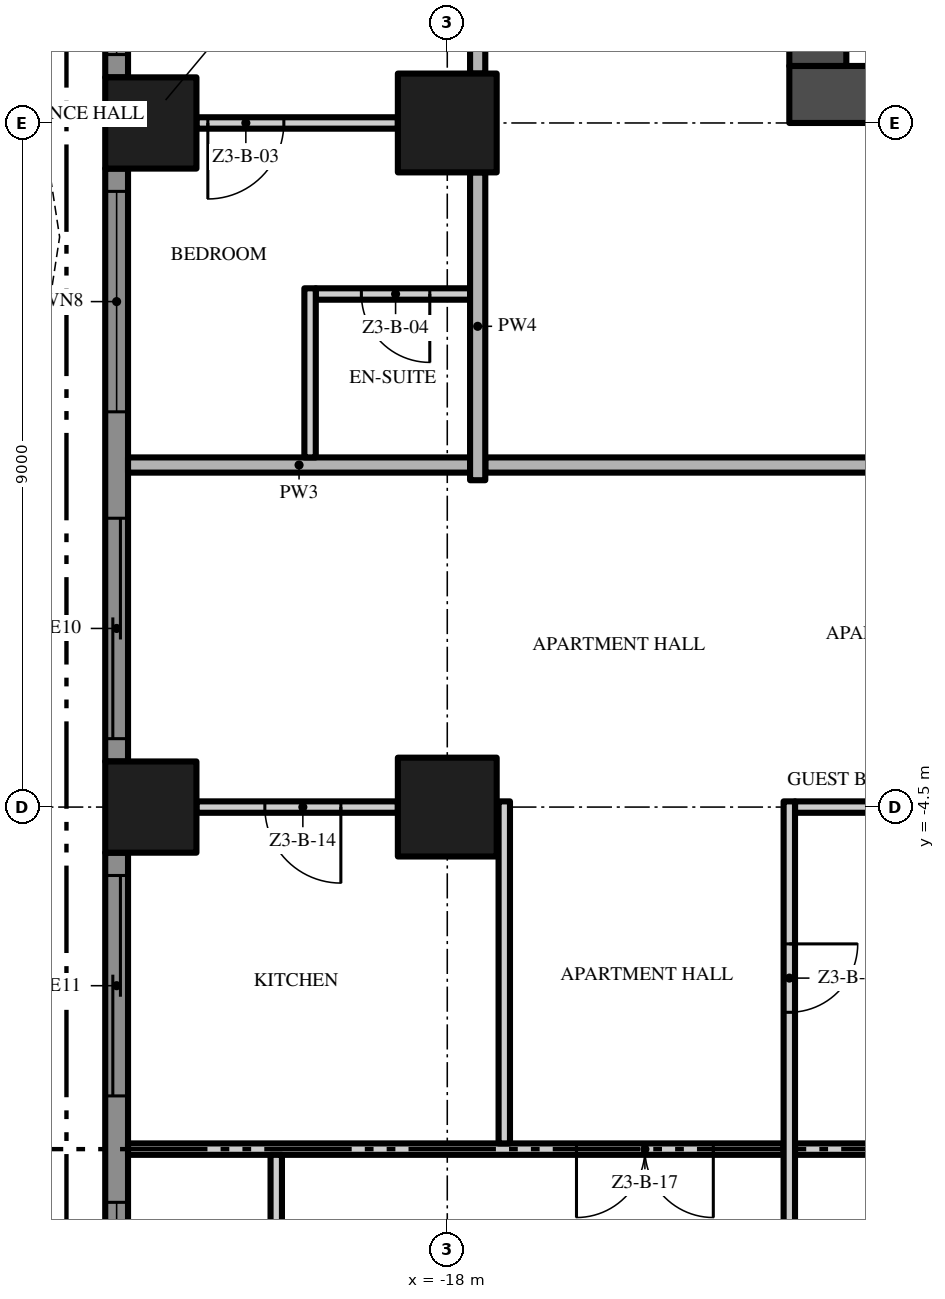
"""IFC4 building model, lengths in metres.
Left out: names, types, materials, properties, quantities, classifications, styles, units other than length and angle.
Written with IfcOpenShell. Run it as: python <this file> out.ifc"""

import sys

from ifc_helpers import new_model, si_unit, direction, frame, frame_2d, origin, origin_2d, place, context, subcontext, project, spatial, polyline, rectangle, outline, extrude, element, fill, save


model = new_model("IFC4")
c1 = context("Model", 3, precision=1e-05, world=origin(), true_north=direction((0.0, 1.0)))
c2 = subcontext(c1, "Body", "Model", "MODEL_VIEW")
j1 = project(units=[si_unit("LENGTHUNIT", "METRE"), si_unit("PLANEANGLEUNIT", "RADIAN")], contexts=[c1])
p1 = place(None, origin())
s1 = spatial("IfcSite", under=j1, at=p1, CompositionType="ELEMENT")
p2 = place(p1, origin())
s2 = spatial("IfcBuilding", under=s1, at=p2, CompositionType="ELEMENT")
p3 = place(p2, frame((0.0, 0.0, 136.4)))
s3 = spatial("IfcBuildingStorey", under=s2, at=p3, CompositionType="ELEMENT", Elevation=136.4)
p4 = place(p3, frame((-13.5, 4.875, -0.3), z_axis=(0.0, 0.0, 1.0), x_axis=(1.0, 0.0, 0.0)))
e1 = element("IfcWall", 1, at=p4, inside=s3, PredefinedType="SHEAR", context=c2, shape_type="SweptSolid", body=[
    extrude(rectangle(XDim=27.0, YDim=0.75, at=frame_2d((13.5, 0.0))), origin(), (0.0, 0.0, 1.0), 3.8),
])
p5 = place(p4, frame((12.0, 0.0, 0.3)))
e2 = element("IfcOpeningElement", 2, at=p5, cuts=e1, PredefinedType="OPENING", context=c2, shape_type="SweptSolid", body=[
    extrude(rectangle(XDim=3.0, YDim=2.4, at=frame_2d((1.5, 1.2))), frame((0.0, 0.385, 0.0), z_axis=(0.0, -1.0, 0.0), x_axis=(1.0, 0.0, 0.0)), (0.0, 0.0, 1.0), 0.77),
])
p6 = place(p4, frame((4.9, 0.0, 0.3)))
e3 = element("IfcOpeningElement", 3, at=p6, cuts=e1, PredefinedType="OPENING", context=c2, shape_type="SweptSolid", body=[
    extrude(rectangle(XDim=1.2, YDim=2.2, at=frame_2d((0.6, 1.1))), frame((0.0, 0.385, 0.0), z_axis=(0.0, -1.0, 0.0), x_axis=(1.0, 0.0, 0.0)), (0.0, 0.0, 1.0), 0.77),
])
p7 = place(p4, frame((20.75, 0.0, 0.3)))
e4 = element("IfcOpeningElement", 4, at=p7, cuts=e1, PredefinedType="OPENING", context=c2, shape_type="SweptSolid", body=[
    extrude(rectangle(XDim=1.5, YDim=2.2, at=frame_2d((0.75, 1.1))), frame((0.0, 0.385, 0.0), z_axis=(0.0, -1.0, 0.0), x_axis=(1.0, 0.0, 0.0)), (0.0, 0.0, 1.0), 0.77),
])
p8 = place(p4, frame((17.4, 0.0, 0.3)))
e5 = element("IfcOpeningElement", 5, at=p8, cuts=e1, PredefinedType="OPENING", context=c2, shape_type="SweptSolid", body=[
    extrude(rectangle(XDim=1.2, YDim=2.2, at=frame_2d((0.6, 1.1))), frame((0.0, 0.385, 0.0), z_axis=(0.0, -1.0, 0.0), x_axis=(1.0, 0.0, 0.0)), (0.0, 0.0, 1.0), 0.77),
])
p9 = place(p3, frame((-13.125, 21.75, -0.3), z_axis=(0.0, 0.0, 1.0), x_axis=(0.0, -1.0, 0.0)))
e6 = element("IfcWall", 6, at=p9, inside=s3, PredefinedType="SHEAR", context=c2, shape_type="SweptSolid", body=[
    extrude(rectangle(XDim=16.5, YDim=0.75, at=frame_2d((8.25, 0.0))), origin(), (0.0, 0.0, 1.0), 3.8),
])
p10 = place(p9, frame((9.15, 0.0, 0.3)))
e7 = element("IfcOpeningElement", 7, at=p10, cuts=e6, PredefinedType="OPENING", context=c2, shape_type="SweptSolid", body=[
    extrude(rectangle(XDim=1.2, YDim=2.2, at=frame_2d((0.6, 1.1))), frame((0.0, 0.385, 0.0), z_axis=(0.0, -1.0, 0.0), x_axis=(1.0, 0.0, 0.0)), (0.0, 0.0, 1.0), 0.77),
])
for number, where, z_axis, x_axis in (
    (8, (-18.0, -4.5, 0.0), (0.0, 0.0, 1.0), (1.0, 0.0, 0.0)),
    (9, (-18.0, 4.5, 0.0), (0.0, 0.0, 1.0), (1.0, 0.0, 0.0)),
):
    element("IfcColumn", number, at=place(p3, frame(where, z_axis=z_axis, x_axis=x_axis)), inside=s3, PredefinedType="COLUMN", context=c2, shape_type="SweptSolid", body=[
        extrude(rectangle(XDim=1.3, YDim=1.3, at=origin_2d()), origin(), (0.0, 0.0, 1.0), 3.5),
    ])
for number, where, z_axis, x_axis in (
    (10, (-21.9, -4.5, 0.0), (0.0, 0.0, 1.0), (1.0, 0.0, 0.0)),
    (11, (-21.9, 4.5, 0.0), (0.0, 0.0, 1.0), (1.0, 0.0, 0.0)),
):
    element("IfcColumn", number, at=place(p3, frame(where, z_axis=z_axis, x_axis=x_axis)), inside=s3, PredefinedType="COLUMN", context=c2, shape_type="SweptSolid", body=[
        extrude(rectangle(XDim=1.2, YDim=1.2, at=origin_2d()), origin(), (0.0, 0.0, 1.0), 3.5),
    ])
p11 = place(p3, frame((-22.35, 5.1, 0.0), z_axis=(0.0, 0.0, 1.0), x_axis=(0.0, 1.0, 0.0)))
e12 = element("IfcWall", 12, at=p11, inside=s3, PredefinedType="SOLIDWALL", context=c2, shape_type="SweptSolid", body=[
    extrude(rectangle(XDim=7.8, YDim=0.3, at=frame_2d((3.9, 0.0))), origin(), (0.0, 0.0, 1.0), 3.5),
])
p12 = place(p11, frame((4.6, 0.0, 0.0)))
e13 = element("IfcOpeningElement", 13, at=p12, cuts=e12, PredefinedType="OPENING", context=c2, shape_type="SweptSolid", body=[
    extrude(rectangle(XDim=2.9, YDim=2.4, at=frame_2d((1.45, 1.2))), frame((0.0, 0.16, 0.0), z_axis=(0.0, -1.0, 0.0), x_axis=(1.0, 0.0, 0.0)), (0.0, 0.0, 1.0), 0.32),
])
p13 = place(p11, frame((0.3, 0.0, 0.45)))
e14 = element("IfcOpeningElement", 14, at=p13, cuts=e12, PredefinedType="OPENING", context=c2, shape_type="SweptSolid", body=[
    extrude(rectangle(XDim=2.9, YDim=2.65, at=frame_2d((1.45, 1.325))), frame((0.0, 0.16, 0.0), z_axis=(0.0, -1.0, 0.0), x_axis=(1.0, 0.0, 0.0)), (0.0, 0.0, 1.0), 0.32),
])
p14 = place(p3, frame((-22.35, -3.9, 0.0), z_axis=(0.0, 0.0, 1.0), x_axis=(0.0, 1.0, 0.0)))
e15 = element("IfcWall", 15, at=p14, inside=s3, PredefinedType="SOLIDWALL", context=c2, shape_type="SweptSolid", body=[
    extrude(rectangle(XDim=7.8, YDim=0.3, at=frame_2d((3.9, 0.0))), origin(), (0.0, 0.0, 1.0), 3.5),
])
p15 = place(p14, frame((4.6, 0.0, 0.45)))
e16 = element("IfcOpeningElement", 16, at=p15, cuts=e15, PredefinedType="OPENING", context=c2, shape_type="SweptSolid", body=[
    extrude(rectangle(XDim=2.9, YDim=2.65, at=frame_2d((1.45, 1.325))), frame((0.0, 0.16, 0.0), z_axis=(0.0, -1.0, 0.0), x_axis=(1.0, 0.0, 0.0)), (0.0, 0.0, 1.0), 0.32),
])
p16 = place(p14, frame((0.3, 0.0, 0.0)))
e17 = element("IfcOpeningElement", 17, at=p16, cuts=e15, PredefinedType="OPENING", context=c2, shape_type="SweptSolid", body=[
    extrude(rectangle(XDim=2.9, YDim=2.4, at=frame_2d((1.45, 1.2))), frame((0.0, 0.16, 0.0), z_axis=(0.0, -1.0, 0.0), x_axis=(1.0, 0.0, 0.0)), (0.0, 0.0, 1.0), 0.32),
])
p17 = place(p3, frame((-22.35, -12.3, 0.0), z_axis=(0.0, 0.0, 1.0), x_axis=(0.0, 1.0, 0.0)))
e18 = element("IfcWall", 18, at=p17, inside=s3, PredefinedType="SOLIDWALL", context=c2, shape_type="SweptSolid", body=[
    extrude(rectangle(XDim=7.2, YDim=0.3, at=frame_2d((3.6, 0.0))), origin(), (0.0, 0.0, 1.0), 3.5),
])
p18 = place(p17, frame((4.0, 0.0, 0.0)))
e19 = element("IfcOpeningElement", 19, at=p18, cuts=e18, PredefinedType="OPENING", context=c2, shape_type="SweptSolid", body=[
    extrude(rectangle(XDim=2.9, YDim=2.4, at=frame_2d((1.45, 1.2))), frame((0.0, 0.16, 0.0), z_axis=(0.0, -1.0, 0.0), x_axis=(1.0, 0.0, 0.0)), (0.0, 0.0, 1.0), 0.32),
])
p19 = place(p17, frame((0.3, 0.0, 0.45)))
e20 = element("IfcOpeningElement", 20, at=p19, cuts=e18, PredefinedType="OPENING", context=c2, shape_type="SweptSolid", body=[
    extrude(rectangle(XDim=2.3, YDim=2.65, at=frame_2d((1.15, 1.325))), frame((0.0, 0.16, 0.0), z_axis=(0.0, -1.0, 0.0), x_axis=(1.0, 0.0, 0.0)), (0.0, 0.0, 1.0), 0.32),
])
p20 = place(p3, origin())
e21 = element("IfcWall", 21, at=p20, inside=s3, PredefinedType="USERDEFINED", context=c2, shape_type="SweptSolid", body=[
    extrude(outline(polyline([(-23.1, 18.0), (-23.329, 16.5), (-23.929, 15.0), (-24.671, 13.5), (-25.271, 12.0), (-25.5, 10.5), (-25.271, 9.0), (-24.671, 7.5), (-23.929, 6.0), (-23.329, 4.5), (-23.1, 3.0), (-23.329, 1.5), (-23.929, 0.0), (-24.671, -1.5), (-25.271, -3.0), (-25.5, -4.5), (-25.271, -6.0), (-24.671, -7.5), (-23.929, -9.0), (-23.329, -10.5), (-23.1, -12.0), (-23.329, -13.5), (-23.082, -13.538), (-22.847, -12.0), (-23.086, -10.434), (-23.701, -8.898), (-24.442, -7.398), (-25.028, -5.934), (-25.247, -4.5), (-25.028, -3.066), (-24.442, -1.602), (-23.701, -0.102), (-23.086, 1.434), (-22.847, 3.0), (-23.086, 4.566), (-23.701, 6.102), (-24.442, 7.602), (-25.028, 9.066), (-25.247, 10.5), (-25.028, 11.934), (-24.442, 13.398), (-23.701, 14.898), (-23.086, 16.434), (-22.853, 17.962), (-23.1, 18.0)])), origin(), (0.0, 0.0, 1.0), 0.9),
])
p21 = place(p3, frame((-13.575, -9.0, 0.0), z_axis=(0.0, 0.0, 1.0), x_axis=(-1.0, 0.0, 0.0)))
e22 = element("IfcWall", 22, at=p21, inside=s3, PredefinedType="PARTITIONING", context=c2, shape_type="SweptSolid", body=[
    extrude(rectangle(XDim=8.625, YDim=0.15, at=frame_2d((4.312, 0.0))), origin(), (0.0, 0.0, 1.0), 3.5),
])
p22 = place(p21, frame((0.925, 0.0, 0.0)))
e23 = element("IfcOpeningElement", 23, at=p22, cuts=e22, PredefinedType="OPENING", context=c2, shape_type="SweptSolid", body=[
    extrude(rectangle(XDim=1.8, YDim=2.4, at=frame_2d((0.9, 1.2))), frame((0.0, 0.085, 0.0), z_axis=(0.0, -1.0, 0.0), x_axis=(1.0, 0.0, 0.0)), (0.0, 0.0, 1.0), 0.17),
])
p23 = place(p3, frame((-13.425, -9.0, 0.0), z_axis=(0.0, 0.0, 1.0), x_axis=(1.0, 0.0, 0.0)))
e24 = element("IfcWall", 24, at=p23, inside=s3, PredefinedType="PARTITIONING", context=c2, shape_type="SweptSolid", body=[
    extrude(rectangle(XDim=2.1, YDim=0.15, at=frame_2d((1.05, 0.0))), origin(), (0.0, 0.0, 1.0), 3.5),
])
p24 = place(p3, frame((-18.65, -4.5, 0.0), z_axis=(0.0, 0.0, 1.0), x_axis=(-1.0, 0.0, 0.0)))
e25 = element("IfcWall", 25, at=p24, inside=s3, PredefinedType="PARTITIONING", context=c2, shape_type="SweptSolid", body=[
    extrude(rectangle(XDim=2.65, YDim=0.15, at=frame_2d((1.325, 0.0))), origin(), (0.0, 0.0, 1.0), 3.5),
])
p25 = place(p24, frame((0.75, 0.0, 0.0)))
e26 = element("IfcOpeningElement", 26, at=p25, cuts=e25, PredefinedType="OPENING", context=c2, shape_type="SweptSolid", body=[
    extrude(rectangle(XDim=1.0, YDim=2.4, at=frame_2d((0.5, 1.2))), frame((0.0, 0.085, 0.0), z_axis=(0.0, -1.0, 0.0), x_axis=(1.0, 0.0, 0.0)), (0.0, 0.0, 1.0), 0.17),
])
p26 = place(p3, frame((-13.425, -4.5, 0.0), z_axis=(0.0, 0.0, 1.0), x_axis=(1.0, 0.0, 0.0)))
e27 = element("IfcWall", 27, at=p26, inside=s3, PredefinedType="PARTITIONING", context=c2, shape_type="SweptSolid", body=[
    extrude(rectangle(XDim=2.1, YDim=0.15, at=frame_2d((1.05, 0.0))), origin(), (0.0, 0.0, 1.0), 3.5),
])
p27 = place(p3, frame((17.5, 0.0, 0.0), z_axis=(0.0, 0.0, 1.0), x_axis=(-1.0, 0.0, 0.0)))
e28 = element("IfcWall", 28, at=p27, inside=s3, PredefinedType="PARTITIONING", context=c2, shape_type="SweptSolid", body=[
    extrude(rectangle(XDim=35.0, YDim=0.2, at=frame_2d((17.5, 0.0))), origin(), (0.0, 0.0, 1.0), 3.5),
])
p28 = place(p27, frame((28.0, 0.0, 0.0)))
e29 = element("IfcOpeningElement", 29, at=p28, cuts=e28, PredefinedType="OPENING", context=c2, shape_type="SweptSolid", body=[
    extrude(rectangle(XDim=1.5, YDim=2.4, at=frame_2d((0.75, 1.2))), frame((0.0, 0.11, 0.0), z_axis=(0.0, -1.0, 0.0), x_axis=(1.0, 0.0, 0.0)), (0.0, 0.0, 1.0), 0.22),
])
p29 = place(p27, frame((10.0, 0.0, 0.0)))
e30 = element("IfcOpeningElement", 30, at=p29, cuts=e28, PredefinedType="OPENING", context=c2, shape_type="SweptSolid", body=[
    extrude(rectangle(XDim=1.5, YDim=2.4, at=frame_2d((0.75, 1.2))), frame((0.0, 0.11, 0.0), z_axis=(0.0, -1.0, 0.0), x_axis=(1.0, 0.0, 0.0)), (0.0, 0.0, 1.0), 0.22),
])
p30 = place(p3, frame((-22.2, 0.0, 0.0), z_axis=(0.0, 0.0, 1.0), x_axis=(1.0, 0.0, 0.0)))
e31 = element("IfcWall", 31, at=p30, inside=s3, PredefinedType="PARTITIONING", context=c2, shape_type="SweptSolid", body=[
    extrude(rectangle(XDim=4.5, YDim=0.2, at=frame_2d((2.25, 0.0))), origin(), (0.0, 0.0, 1.0), 3.5),
])
p31 = place(p3, frame((-17.7, 2.25, 0.0), z_axis=(0.0, 0.0, 1.0), x_axis=(-1.0, 0.0, 0.0)))
e32 = element("IfcWall", 32, at=p31, inside=s3, PredefinedType="PARTITIONING", context=c2, shape_type="SweptSolid", body=[
    extrude(rectangle(XDim=2.03, YDim=0.15, at=frame_2d((1.015, 0.0))), origin(), (0.0, 0.0, 1.0), 3.5),
])
p32 = place(p31, frame((0.53, 0.0, 0.0)))
e33 = element("IfcOpeningElement", 33, at=p32, cuts=e32, PredefinedType="OPENING", context=c2, shape_type="SweptSolid", body=[
    extrude(rectangle(XDim=0.9, YDim=2.1, at=frame_2d((0.45, 1.05))), frame((0.0, 0.085, 0.0), z_axis=(0.0, -1.0, 0.0), x_axis=(1.0, 0.0, 0.0)), (0.0, 0.0, 1.0), 0.17),
])
p33 = place(p3, frame((-18.65, 4.5, 0.0), z_axis=(0.0, 0.0, 1.0), x_axis=(-1.0, 0.0, 0.0)))
e34 = element("IfcWall", 34, at=p33, inside=s3, PredefinedType="PARTITIONING", context=c2, shape_type="SweptSolid", body=[
    extrude(rectangle(XDim=2.65, YDim=0.15, at=frame_2d((1.325, 0.0))), origin(), (0.0, 0.0, 1.0), 3.5),
])
p34 = place(p33, frame((1.5, 0.0, 0.0)))
e35 = element("IfcOpeningElement", 35, at=p34, cuts=e34, PredefinedType="OPENING", context=c2, shape_type="SweptSolid", body=[
    extrude(rectangle(XDim=1.0, YDim=2.4, at=frame_2d((0.5, 1.2))), frame((0.0, 0.085, 0.0), z_axis=(0.0, -1.0, 0.0), x_axis=(1.0, 0.0, 0.0)), (0.0, 0.0, 1.0), 0.17),
])
p35 = place(p3, frame((-20.25, -12.075, 0.0), z_axis=(0.0, 0.0, 1.0), x_axis=(0.0, 1.0, 0.0)))
e36 = element("IfcWall", 36, at=p35, inside=s3, PredefinedType="PARTITIONING", context=c2, shape_type="SweptSolid", body=[
    extrude(rectangle(XDim=3.0, YDim=0.15, at=frame_2d((1.5, 0.0))), origin(), (0.0, 0.0, 1.0), 3.5),
])
p36 = place(p35, frame((1.125, 0.0, 0.0)))
e37 = element("IfcOpeningElement", 37, at=p36, cuts=e36, PredefinedType="OPENING", context=c2, shape_type="SweptSolid", body=[
    extrude(rectangle(XDim=0.9, YDim=2.1, at=frame_2d((0.45, 1.05))), frame((0.0, 0.085, 0.0), z_axis=(0.0, -1.0, 0.0), x_axis=(1.0, 0.0, 0.0)), (0.0, 0.0, 1.0), 0.17),
])
p37 = place(p3, frame((-19.805, 0.1, 0.0), z_axis=(0.0, 0.0, 1.0), x_axis=(0.0, 1.0, 0.0)))
e38 = element("IfcWall", 38, at=p37, inside=s3, PredefinedType="PARTITIONING", context=c2, shape_type="SweptSolid", body=[
    extrude(rectangle(XDim=2.225, YDim=0.15, at=frame_2d((1.113, 0.0))), origin(), (0.0, 0.0, 1.0), 3.5),
])
p38 = place(p3, frame((-17.6, -0.2, 0.0), z_axis=(0.0, 0.0, 1.0), x_axis=(0.0, 1.0, 0.0)))
e39 = element("IfcWall", 39, at=p38, inside=s3, PredefinedType="PARTITIONING", context=c2, shape_type="SweptSolid", body=[
    extrude(rectangle(XDim=4.05, YDim=0.2, at=frame_2d((2.025, 0.0))), origin(), (0.0, 0.0, 1.0), 3.5),
])
p39 = place(p3, frame((-17.6, 5.15, 0.0), z_axis=(0.0, 0.0, 1.0), x_axis=(0.0, 1.0, 0.0)))
e40 = element("IfcWall", 40, at=p39, inside=s3, PredefinedType="PARTITIONING", context=c2, shape_type="SweptSolid", body=[
    extrude(rectangle(XDim=7.7, YDim=0.2, at=frame_2d((3.85, 0.0))), origin(), (0.0, 0.0, 1.0), 3.5),
])
p40 = place(p39, frame((1.0, 0.0, 0.0)))
e41 = element("IfcOpeningElement", 41, at=p40, cuts=e40, PredefinedType="OPENING", context=c2, shape_type="SweptSolid", body=[
    extrude(rectangle(XDim=1.2, YDim=2.4, at=frame_2d((0.6, 1.2))), frame((0.0, 0.11, 0.0), z_axis=(0.0, -1.0, 0.0), x_axis=(1.0, 0.0, 0.0)), (0.0, 0.0, 1.0), 0.22),
])
p41 = place(p3, frame((-17.25, -8.925, 0.0), z_axis=(0.0, 0.0, 1.0), x_axis=(0.0, 1.0, 0.0)))
e42 = element("IfcWall", 42, at=p41, inside=s3, PredefinedType="PARTITIONING", context=c2, shape_type="SweptSolid", body=[
    extrude(rectangle(XDim=4.5, YDim=0.15, at=frame_2d((2.25, 0.0))), origin(), (0.0, 0.0, 1.0), 3.5),
])
p42 = place(p3, frame((-13.5, -4.425, 0.0), z_axis=(0.0, 0.0, 1.0), x_axis=(0.0, -1.0, 0.0)))
e43 = element("IfcWall", 43, at=p42, inside=s3, PredefinedType="PARTITIONING", context=c2, shape_type="SweptSolid", body=[
    extrude(rectangle(XDim=13.275, YDim=0.15, at=frame_2d((6.638, 0.0))), origin(), (0.0, 0.0, 1.0), 3.5),
])
p43 = place(p42, frame((1.875, 0.0, 0.0)))
e44 = element("IfcOpeningElement", 44, at=p43, cuts=e43, PredefinedType="OPENING", context=c2, shape_type="SweptSolid", body=[
    extrude(rectangle(XDim=0.9, YDim=2.1, at=frame_2d((0.45, 1.05))), frame((0.0, 0.085, 0.0), z_axis=(0.0, -1.0, 0.0), x_axis=(1.0, 0.0, 0.0)), (0.0, 0.0, 1.0), 0.17),
])
p44 = place(p13, origin())
e45 = element("IfcWindow", 45, at=p44, inside=s3, PartitioningType="SINGLE_PANEL", PredefinedType="WINDOW", context=c2, shape_type="SweptSolid", body=[
    extrude(rectangle(XDim=2.9, YDim=2.65, at=frame_2d((1.45, 1.325))), frame((0.0, 0.03, 0.0), z_axis=(0.0, -1.0, 0.0), x_axis=(1.0, 0.0, 0.0)), (0.0, 0.0, 1.0), 0.06),
])
fill(e14, e45)
p45 = place(p15, origin())
e46 = element("IfcWindow", 46, at=p45, inside=s3, PartitioningType="SINGLE_PANEL", PredefinedType="WINDOW", context=c2, shape_type="SweptSolid", body=[
    extrude(rectangle(XDim=2.9, YDim=2.65, at=frame_2d((1.45, 1.325))), frame((0.0, 0.03, 0.0), z_axis=(0.0, -1.0, 0.0), x_axis=(1.0, 0.0, 0.0)), (0.0, 0.0, 1.0), 0.06),
])
fill(e16, e46)
p46 = place(p16, origin())
e47 = element("IfcDoor", 47, at=p46, inside=s3, OperationType="SINGLE_SWING_LEFT", PredefinedType="DOOR", context=c2, shape_type="SweptSolid", body=[
    extrude(rectangle(XDim=2.9, YDim=2.4, at=frame_2d((1.45, 1.2))), frame((0.0, 0.025, 0.0), z_axis=(0.0, -1.0, 0.0), x_axis=(1.0, 0.0, 0.0)), (0.0, 0.0, 1.0), 0.05),
])
fill(e17, e47)
p47 = place(p18, origin())
e48 = element("IfcDoor", 48, at=p47, inside=s3, OperationType="SINGLE_SWING_LEFT", PredefinedType="DOOR", context=c2, shape_type="SweptSolid", body=[
    extrude(rectangle(XDim=2.9, YDim=2.4, at=frame_2d((1.45, 1.2))), frame((0.0, 0.025, 0.0), z_axis=(0.0, -1.0, 0.0), x_axis=(1.0, 0.0, 0.0)), (0.0, 0.0, 1.0), 0.05),
])
fill(e19, e48)
p48 = place(p19, origin())
e49 = element("IfcWindow", 49, at=p48, inside=s3, PartitioningType="SINGLE_PANEL", PredefinedType="WINDOW", context=c2, shape_type="SweptSolid", body=[
    extrude(rectangle(XDim=2.3, YDim=2.65, at=frame_2d((1.15, 1.325))), frame((0.0, 0.03, 0.0), z_axis=(0.0, -1.0, 0.0), x_axis=(1.0, 0.0, 0.0)), (0.0, 0.0, 1.0), 0.06),
])
fill(e20, e49)
p49 = place(p34, origin())
e50 = element("IfcDoor", 50, at=p49, inside=s3, OperationType="SINGLE_SWING_RIGHT", PredefinedType="DOOR", context=c2, shape_type="SweptSolid", body=[
    extrude(rectangle(XDim=1.0, YDim=2.4, at=frame_2d((0.5, 1.2))), frame((0.0, 0.025, 0.0), z_axis=(0.0, -1.0, 0.0), x_axis=(1.0, 0.0, 0.0)), (0.0, 0.0, 1.0), 0.05),
])
fill(e35, e50)
p50 = place(p32, origin())
e51 = element("IfcDoor", 51, at=p50, inside=s3, OperationType="SINGLE_SWING_LEFT", PredefinedType="DOOR", context=c2, shape_type="SweptSolid", body=[
    extrude(rectangle(XDim=0.9, YDim=2.1, at=frame_2d((0.45, 1.05))), frame((0.0, 0.025, 0.0), z_axis=(0.0, -1.0, 0.0), x_axis=(1.0, 0.0, 0.0)), (0.0, 0.0, 1.0), 0.05),
])
fill(e33, e51)
p51 = place(p25, origin())
e52 = element("IfcDoor", 52, at=p51, inside=s3, OperationType="SINGLE_SWING_LEFT", PredefinedType="DOOR", context=c2, shape_type="SweptSolid", body=[
    extrude(rectangle(XDim=1.0, YDim=2.4, at=frame_2d((0.5, 1.2))), frame((0.0, 0.025, 0.0), z_axis=(0.0, -1.0, 0.0), x_axis=(1.0, 0.0, 0.0)), (0.0, 0.0, 1.0), 0.05),
])
fill(e26, e52)
p52 = place(p43, origin())
e53 = element("IfcDoor", 53, at=p52, inside=s3, OperationType="SINGLE_SWING_LEFT", PredefinedType="DOOR", context=c2, shape_type="SweptSolid", body=[
    extrude(rectangle(XDim=0.9, YDim=2.1, at=frame_2d((0.45, 1.05))), frame((0.0, 0.025, 0.0), z_axis=(0.0, -1.0, 0.0), x_axis=(1.0, 0.0, 0.0)), (0.0, 0.0, 1.0), 0.05),
])
fill(e44, e53)
p53 = place(p22, origin())
e54 = element("IfcDoor", 54, at=p53, inside=s3, OperationType="DOUBLE_DOOR_SINGLE_SWING", PredefinedType="DOOR", context=c2, shape_type="SweptSolid", body=[
    extrude(rectangle(XDim=1.8, YDim=2.4, at=frame_2d((0.9, 1.2))), frame((0.0, 0.025, 0.0), z_axis=(0.0, -1.0, 0.0), x_axis=(1.0, 0.0, 0.0)), (0.0, 0.0, 1.0), 0.05),
])
fill(e23, e54)
save(model, sys.argv[1])
